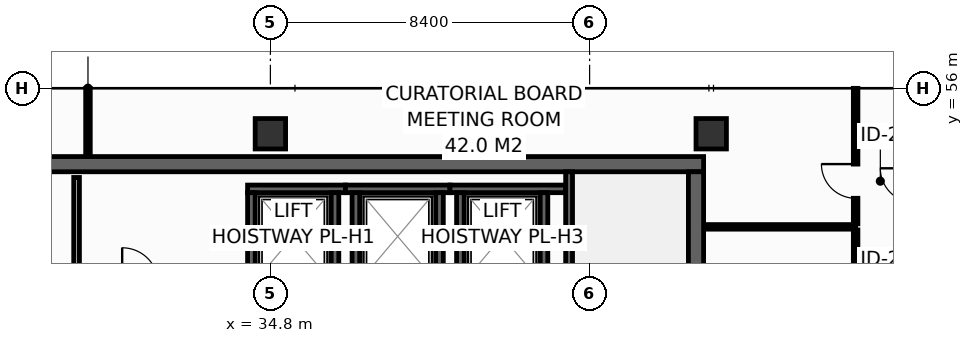
"""IFC4 building model, lengths in metres.
Left out: names, types, materials, properties, quantities, classifications, styles, units other than length and angle.
Written with IfcOpenShell. Run it as: python <this file> out.ifc"""

import sys

from ifc_helpers import new_model, si_unit, direction, frame, frame_2d, origin, origin_2d, place, context, subcontext, project, spatial, rectangle, hollow_rectangle, extrude, element, fill, save


model = new_model("IFC4")
c1 = context("Model", 3, precision=1e-05, world=origin(), true_north=direction((0.0, 1.0)))
c2 = subcontext(c1, "Body", "Model", "MODEL_VIEW")
j1 = project(units=[si_unit("LENGTHUNIT", "METRE"), si_unit("PLANEANGLEUNIT", "RADIAN")], contexts=[c1])
p1 = place(None, origin())
s1 = spatial("IfcSite", under=j1, at=p1, CompositionType="ELEMENT")
p2 = place(p1, origin())
s2 = spatial("IfcBuilding", under=s1, at=p2, CompositionType="ELEMENT")
p3 = place(p2, frame((0.0, 0.0, 245.8)))
s3 = spatial("IfcBuildingStorey", under=s2, at=p3, CompositionType="ELEMENT", Elevation=245.8)
p4 = place(p3, frame((13.7, 54.0, 0.0), z_axis=(0.0, 0.0, 1.0), x_axis=(1.0, 0.0, 0.0)))
e1 = element("IfcWall", 1, at=p4, inside=s3, PredefinedType="SHEAR", context=c2, shape_type="SweptSolid", body=[
    extrude(rectangle(XDim=32.5, YDim=0.4, at=frame_2d((16.25, 0.0))), origin(), (0.0, 0.0, 1.0), 3.55),
])
p5 = place(p3, frame((46.0, 43.4, 0.0), z_axis=(0.0, 0.0, 1.0), x_axis=(0.0, 1.0, 0.0)))
e2 = element("IfcWall", 2, at=p5, inside=s3, PredefinedType="SHEAR", context=c2, shape_type="SweptSolid", body=[
    extrude(rectangle(XDim=10.4, YDim=0.4, at=frame_2d((5.2, 0.0))), origin(), (0.0, 0.0, 1.0), 3.55),
])
for number, where, z_axis, x_axis in (
    (3, (34.8, 54.8, 0.0), (0.0, 0.0, 1.0), (1.0, 0.0, 0.0)),
    (4, (46.4, 54.8, 0.0), (0.0, 0.0, 1.0), (1.0, 0.0, 0.0)),
):
    element("IfcColumn", number, at=place(p3, frame(where, z_axis=z_axis, x_axis=x_axis)), inside=s3, PredefinedType="COLUMN", context=c2, shape_type="SweptSolid", body=[
        extrude(hollow_rectangle(XDim=0.8, YDim=0.8, WallThickness=0.036, at=origin_2d()), origin(), (0.0, 0.0, 1.0), 3.8),
    ])
p6 = place(p3, frame((34.2, 53.35, 0.0), z_axis=(0.0, 0.0, 1.0), x_axis=(1.0, 0.0, 0.0)))
e5 = element("IfcWall", 5, at=p6, inside=s3, PredefinedType="SHEAR", context=c2, shape_type="SweptSolid", body=[
    extrude(rectangle(XDim=2.575, YDim=0.2, at=frame_2d((1.288, 0.0))), origin(), (0.0, 0.0, 1.0), 3.55),
])
for number, where, z_axis, x_axis in (
    (6, (34.3, 50.95, 0.0), (0.0, 0.0, 1.0), (0.0, 1.0, 0.0)),
    (7, (36.5, 50.95, 0.0), (0.0, 0.0, 1.0), (0.0, 1.0, 0.0)),
):
    element("IfcWall", number, at=place(p3, frame(where, z_axis=z_axis, x_axis=x_axis)), inside=s3, PredefinedType="SHEAR", context=c2, shape_type="SweptSolid", body=[
        extrude(rectangle(XDim=2.3, YDim=0.2, at=frame_2d((1.15, 0.0))), origin(), (0.0, 0.0, 1.0), 3.55),
    ])
p7 = place(p3, frame((36.775, 53.35, 0.0), z_axis=(0.0, 0.0, 1.0), x_axis=(1.0, 0.0, 0.0)))
e8 = element("IfcWall", 8, at=p7, inside=s3, PredefinedType="SHEAR", context=c2, shape_type="SweptSolid", body=[
    extrude(rectangle(XDim=2.75, YDim=0.2, at=frame_2d((1.375, 0.0))), origin(), (0.0, 0.0, 1.0), 3.55),
])
for number, where, z_axis, x_axis in (
    (9, (37.05, 50.95, 0.0), (0.0, 0.0, 1.0), (0.0, 1.0, 0.0)),
    (10, (39.25, 50.95, 0.0), (0.0, 0.0, 1.0), (0.0, 1.0, 0.0)),
):
    element("IfcWall", number, at=place(p3, frame(where, z_axis=z_axis, x_axis=x_axis)), inside=s3, PredefinedType="SHEAR", context=c2, shape_type="SweptSolid", body=[
        extrude(rectangle(XDim=2.3, YDim=0.2, at=frame_2d((1.15, 0.0))), origin(), (0.0, 0.0, 1.0), 3.55),
    ])
p8 = place(p3, frame((39.525, 53.35, 0.0), z_axis=(0.0, 0.0, 1.0), x_axis=(1.0, 0.0, 0.0)))
e11 = element("IfcWall", 11, at=p8, inside=s3, PredefinedType="SHEAR", context=c2, shape_type="SweptSolid", body=[
    extrude(rectangle(XDim=3.045, YDim=0.2, at=frame_2d((1.522, 0.0))), origin(), (0.0, 0.0, 1.0), 3.55),
])
for number, where, z_axis, x_axis in (
    (12, (39.8, 50.95, 0.0), (0.0, 0.0, 1.0), (0.0, 1.0, 0.0)),
    (13, (42.0, 50.95, 0.0), (0.0, 0.0, 1.0), (0.0, 1.0, 0.0)),
):
    element("IfcWall", number, at=place(p3, frame(where, z_axis=z_axis, x_axis=x_axis)), inside=s3, PredefinedType="SHEAR", context=c2, shape_type="SweptSolid", body=[
        extrude(rectangle(XDim=2.3, YDim=0.2, at=frame_2d((1.15, 0.0))), origin(), (0.0, 0.0, 1.0), 3.55),
    ])
p9 = place(p3, frame((42.66, 53.8, 0.0), z_axis=(0.0, 0.0, 1.0), x_axis=(0.0, -1.0, 0.0)))
e14 = element("IfcWall", 14, at=p9, inside=s3, PredefinedType="SHEAR", context=c2, shape_type="SweptSolid", body=[
    extrude(rectangle(XDim=10.4, YDim=0.18, at=frame_2d((5.2, 0.0))), origin(), (0.0, 0.0, 1.0), 3.55),
])
p10 = place(p9, frame((8.99, 0.0, 0.0)))
e15 = element("IfcOpeningElement", 15, at=p10, cuts=e14, PredefinedType="OPENING", context=c2, shape_type="SweptSolid", body=[
    extrude(rectangle(XDim=1.1, YDim=2.15, at=frame_2d((0.55, 1.075))), frame((0.0, 0.1, 0.0), z_axis=(0.0, -1.0, 0.0), x_axis=(1.0, 0.0, 0.0)), (0.0, 0.0, 1.0), 0.2),
])
p11 = place(p3, frame((29.7, 50.95, 0.0), z_axis=(0.0, 0.0, 1.0), x_axis=(0.0, 1.0, 0.0)))
e16 = element("IfcWall", 16, at=p11, inside=s3, PredefinedType="PARTITIONING", context=c2, shape_type="SweptSolid", body=[
    extrude(rectangle(XDim=2.7, YDim=0.15, at=frame_2d((1.35, 0.0))), origin(), (0.0, 0.0, 1.0), 3.55),
])
p12 = place(p3, frame((46.22, 52.35, 0.0), z_axis=(0.0, 0.0, 1.0), x_axis=(1.0, 0.0, 0.0)))
e17 = element("IfcWall", 17, at=p12, inside=s3, PredefinedType="PARTITIONING", context=c2, shape_type="SweptSolid", body=[
    extrude(rectangle(XDim=3.98, YDim=0.12, at=frame_2d((1.99, 0.0))), origin(), (0.0, 0.0, 1.0), 3.55),
])
p13 = place(p3, frame((30.0, 54.22, 0.0), z_axis=(0.0, 0.0, 1.0), x_axis=(0.0, 1.0, 0.0)))
e18 = element("IfcWall", 18, at=p13, inside=s3, PredefinedType="PARTITIONING", context=c2, shape_type="SweptSolid", body=[
    extrude(rectangle(XDim=1.775, YDim=0.12, at=frame_2d((0.888, 0.0))), origin(), (0.0, 0.0, 1.0), 2.935),
])
p14 = place(p3, frame((50.2, 48.29, 0.0), z_axis=(0.0, 0.0, 1.0), x_axis=(0.0, 1.0, 0.0)))
e19 = element("IfcWall", 19, at=p14, inside=s3, PredefinedType="PARTITIONING", context=c2, shape_type="SweptSolid", body=[
    extrude(rectangle(XDim=3.98, YDim=0.12, at=frame_2d((1.99, 0.0))), origin(), (0.0, 0.0, 1.0), 3.55),
])
p15 = place(p14, frame((1.54, 0.0, 0.0)))
e20 = element("IfcOpeningElement", 20, at=p15, cuts=e19, PredefinedType="OPENING", context=c2, shape_type="SweptSolid", body=[
    extrude(rectangle(XDim=0.9, YDim=2.1, at=frame_2d((0.45, 1.05))), frame((0.0, 0.07, 0.0), z_axis=(0.0, -1.0, 0.0), x_axis=(1.0, 0.0, 0.0)), (0.0, 0.0, 1.0), 0.14),
])
p16 = place(p3, frame((50.2, 52.43, 0.0), z_axis=(0.0, 0.0, 1.0), x_axis=(0.0, 1.0, 0.0)))
e21 = element("IfcWall", 21, at=p16, inside=s3, PredefinedType="PARTITIONING", context=c2, shape_type="SweptSolid", body=[
    extrude(rectangle(XDim=3.565, YDim=0.12, at=frame_2d((1.783, 0.0))), origin(), (0.0, 0.0, 1.0), 2.935),
])
p17 = place(p16, frame((0.672, 0.0, 0.0)))
e22 = element("IfcOpeningElement", 22, at=p17, cuts=e21, PredefinedType="OPENING", context=c2, shape_type="SweptSolid", body=[
    extrude(rectangle(XDim=0.9, YDim=2.1, at=frame_2d((0.45, 1.05))), frame((0.0, 0.07, 0.0), z_axis=(0.0, -1.0, 0.0), x_axis=(1.0, 0.0, 0.0)), (0.0, 0.0, 1.0), 0.14),
])
p18 = place(p17, origin())
e23 = element("IfcDoor", 23, at=p18, inside=s3, OperationType="SINGLE_SWING_RIGHT", PredefinedType="DOOR", context=c2, shape_type="SweptSolid", body=[
    extrude(rectangle(XDim=0.9, YDim=2.1, at=frame_2d((0.45, 1.05))), frame((0.0, 0.025, 0.0), z_axis=(0.0, -1.0, 0.0), x_axis=(1.0, 0.0, 0.0)), (0.0, 0.0, 1.0), 0.05),
])
fill(e22, e23)
save(model, sys.argv[1])
